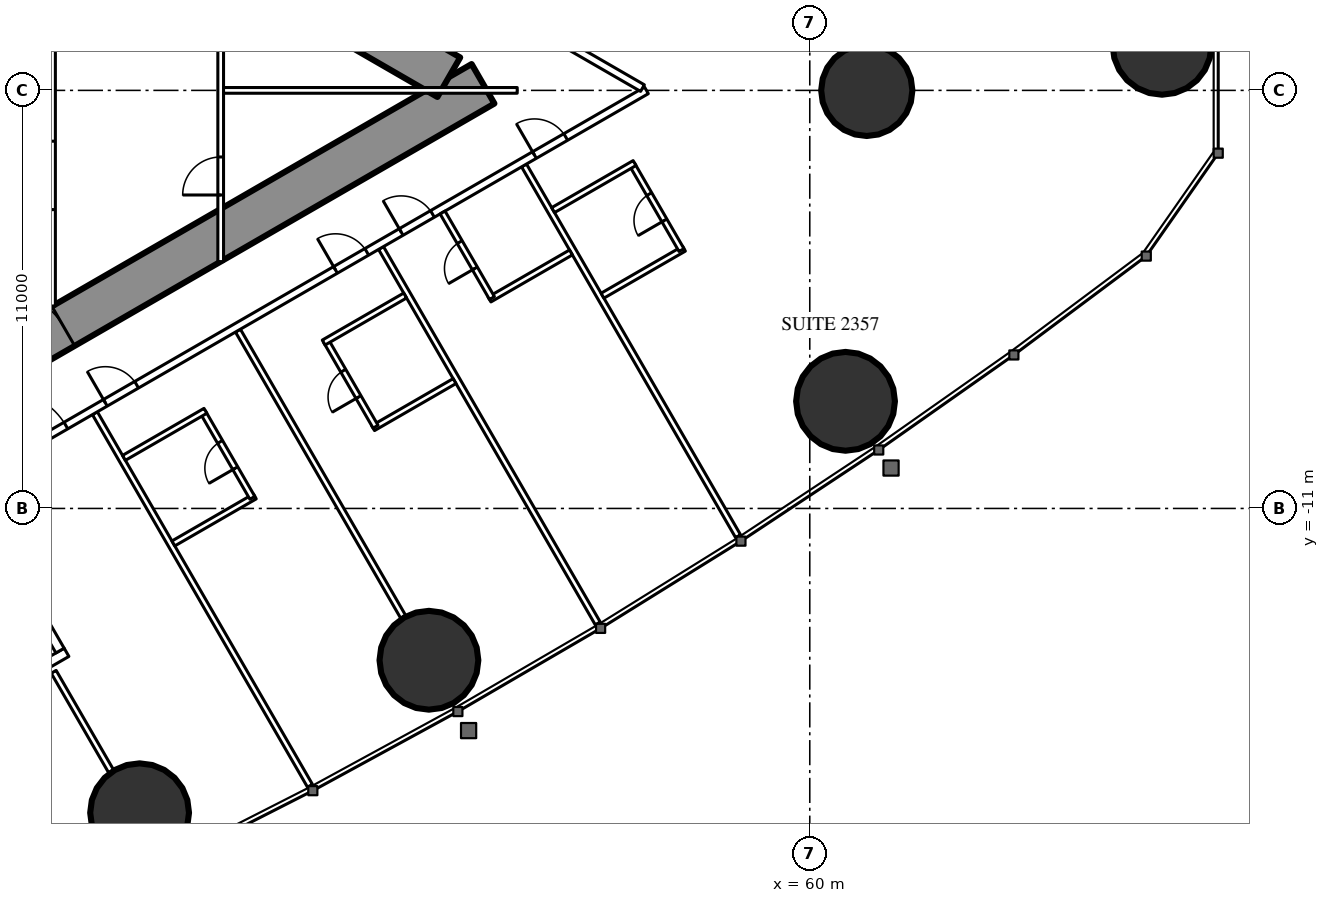
"""IFC4 building model, lengths in metres.
Left out: names, types, materials, properties, quantities, classifications, styles, units other than length and angle.
Written with IfcOpenShell. Run it as: python <this file> out.ifc"""

import sys

from ifc_helpers import new_model, si_unit, direction, frame, frame_2d, origin, origin_2d, place, context, subcontext, project, spatial, rectangle, circle, hollow_circle, extrude, element, fill, save


model = new_model("IFC4")
c1 = context("Model", 3, precision=1e-05, world=origin(), true_north=direction((0.0, 1.0)))
c2 = subcontext(c1, "Body", "Model", "MODEL_VIEW")
j1 = project(units=[si_unit("LENGTHUNIT", "METRE"), si_unit("PLANEANGLEUNIT", "RADIAN")], contexts=[c1])
p1 = place(None, origin())
s1 = spatial("IfcSite", under=j1, at=p1, CompositionType="ELEMENT")
p2 = place(p1, origin())
s2 = spatial("IfcBuilding", under=s1, at=p2, CompositionType="ELEMENT")
p3 = place(p2, frame((0.0, 0.0, 90.6)))
s3 = spatial("IfcBuildingStorey", under=s2, at=p3, CompositionType="ELEMENT", Elevation=90.6)
for number, where, z_axis, x_axis in (
    (1, (69.269, 1.187, 0.0), (0.0, 0.0, 1.0), (1.0, 0.0, 0.0)),
    (2, (42.366, -19.007, 0.0), (0.0, 0.0, 1.0), (1.0, 0.0, 0.0)),
    (3, (49.979, -14.994, 0.0), (0.0, 0.0, 1.0), (1.0, 0.0, 0.0)),
    (4, (60.941, -8.181, 0.0), (0.0, 0.0, 1.0), (1.0, 0.0, 0.0)),
):
    element("IfcColumn", number, at=place(p3, frame(where, z_axis=z_axis, x_axis=x_axis)), inside=s3, PredefinedType="COLUMN", context=c2, shape_type="SweptSolid", body=[
        extrude(hollow_circle(Radius=1.3, WallThickness=0.1, at=origin_2d()), origin(), (0.0, 0.0, 1.0), 3.5),
    ])
p4 = place(p3, frame((61.5, 0.0, 0.0), z_axis=(0.0, 0.0, 1.0), x_axis=(1.0, 0.0, 0.0)))
e5 = element("IfcColumn", 5, at=p4, inside=s3, PredefinedType="COLUMN", context=c2, shape_type="SweptSolid", body=[
    extrude(circle(Radius=1.2, at=origin_2d()), origin(), (0.0, 0.0, 1.0), 3.5),
])
p5 = place(p3, frame((27.2, -13.8, 0.0), z_axis=(0.0, 0.0, 1.0), x_axis=(0.866027159892, 0.499996958321, 0.0)))
e6 = element("IfcWall", 6, at=p5, inside=s3, PredefinedType="SHEAR", context=c2, shape_type="SweptSolid", body=[
    extrude(rectangle(XDim=27.947, YDim=1.2, at=frame_2d((13.973, 0.0))), origin(), (0.0, 0.0, 1.0), 3.5),
])
p6 = place(p5, frame((4.6, 0.0, 0.0)))
e7 = element("IfcOpeningElement", 7, at=p6, cuts=e6, PredefinedType="OPENING", context=c2, shape_type="SweptSolid", body=[
    extrude(rectangle(XDim=1.0, YDim=2.2, at=frame_2d((0.5, 1.1))), frame((0.0, 0.61, 0.0), z_axis=(0.0, -1.0, 0.0), x_axis=(1.0, 0.0, 0.0)), (0.0, 0.0, 1.0), 1.22),
])
p7 = place(p5, frame((13.395, 0.0, 0.0)))
e8 = element("IfcOpeningElement", 8, at=p7, cuts=e6, PredefinedType="OPENING", context=c2, shape_type="SweptSolid", body=[
    extrude(rectangle(XDim=1.8, YDim=2.2, at=frame_2d((0.9, 1.1))), frame((0.0, 0.61, 0.0), z_axis=(0.0, -1.0, 0.0), x_axis=(1.0, 0.0, 0.0)), (0.0, 0.0, 1.0), 1.22),
])
p8 = place(p3, frame((27.2, 13.8, 0.0), z_axis=(0.0, 0.0, 1.0), x_axis=(0.866024515034, -0.500001539357, 0.0)))
e9 = element("IfcWall", 9, at=p8, inside=s3, PredefinedType="SHEAR", context=c2, shape_type="SweptSolid", body=[
    extrude(rectangle(XDim=26.907, YDim=1.2, at=frame_2d((13.454, 0.0))), origin(), (0.0, 0.0, 1.0), 3.5),
])
p9 = place(p8, frame((4.6, 0.0, 0.0)))
e10 = element("IfcOpeningElement", 10, at=p9, cuts=e9, PredefinedType="OPENING", context=c2, shape_type="SweptSolid", body=[
    extrude(rectangle(XDim=1.0, YDim=2.2, at=frame_2d((0.5, 1.1))), frame((0.0, 0.61, 0.0), z_axis=(0.0, -1.0, 0.0), x_axis=(1.0, 0.0, 0.0)), (0.0, 0.0, 1.0), 1.22),
])
p10 = place(p8, frame((13.395, 0.0, 0.0)))
e11 = element("IfcOpeningElement", 11, at=p10, cuts=e9, PredefinedType="OPENING", context=c2, shape_type="SweptSolid", body=[
    extrude(rectangle(XDim=1.8, YDim=2.2, at=frame_2d((0.9, 1.1))), frame((0.0, 0.61, 0.0), z_axis=(0.0, -1.0, 0.0), x_axis=(1.0, 0.0, 0.0)), (0.0, 0.0, 1.0), 1.22),
])
p11 = place(p3, frame((41.19, -8.494, 0.0), z_axis=(0.0, 0.0, 1.0), x_axis=(0.49999258054, -0.866029687369, 0.0)))
e12 = element("IfcWall", 12, at=p11, inside=s3, PredefinedType="PARTITIONING", context=c2, shape_type="SweptSolid", body=[
    extrude(rectangle(XDim=11.318, YDim=0.15, at=frame_2d((5.659, 0.0))), origin(), (0.0, 0.0, 1.0), 3.25),
])
p12 = place(p3, frame((44.954, -6.321, 0.0), z_axis=(0.0, 0.0, 1.0), x_axis=(0.500018676722, -0.866014620505, 0.0)))
e13 = element("IfcWall", 13, at=p12, inside=s3, PredefinedType="PARTITIONING", context=c2, shape_type="SweptSolid", body=[
    extrude(rectangle(XDim=8.704, YDim=0.15, at=frame_2d((4.352, 0.0))), origin(), (0.0, 0.0, 1.0), 2.2),
])
p13 = place(p3, frame((48.719, -4.147, 0.0), z_axis=(0.0, 0.0, 1.0), x_axis=(0.499990498062, -0.866030889661, 0.0)))
e14 = element("IfcWall", 14, at=p13, inside=s3, PredefinedType="PARTITIONING", context=c2, shape_type="SweptSolid", body=[
    extrude(rectangle(XDim=11.406, YDim=0.15, at=frame_2d((5.703, 0.0))), origin(), (0.0, 0.0, 1.0), 3.25),
])
p14 = place(p3, frame((52.481, -1.975, 0.0), z_axis=(0.0, 0.0, 1.0), x_axis=(0.500003867771, -0.866023170714, 0.0)))
e15 = element("IfcWall", 15, at=p14, inside=s3, PredefinedType="PARTITIONING", context=c2, shape_type="SweptSolid", body=[
    extrude(rectangle(XDim=11.265, YDim=0.15, at=frame_2d((5.632, 0.0))), origin(), (0.0, 0.0, 1.0), 3.25),
])
p15 = place(p3, frame((40.105, -15.299, 0.0), z_axis=(0.0, 0.0, 1.0), x_axis=(0.499978822259, -0.866037630414, 0.0)))
e16 = element("IfcWall", 16, at=p15, inside=s3, PredefinedType="PARTITIONING", context=c2, shape_type="SweptSolid", body=[
    extrude(rectangle(XDim=3.023, YDim=0.15, at=frame_2d((1.511, 0.0))), origin(), (0.0, 0.0, 1.0), 3.25),
])
p16 = place(p3, frame((37.96, -10.243, 0.0), z_axis=(0.0, 0.0, 1.0), x_axis=(0.866026429433, 0.499998223521, 0.0)))
e17 = element("IfcWall", 17, at=p16, inside=s3, PredefinedType="PARTITIONING", context=c2, shape_type="SweptSolid", body=[
    extrude(rectangle(XDim=20.487, YDim=0.2, at=frame_2d((10.243, 0.0))), origin(), (0.0, 0.0, 1.0), 3.25),
])
p17 = place(p16, frame((4.047, 0.0, 0.0)))
e18 = element("IfcOpeningElement", 18, at=p17, cuts=e17, PredefinedType="OPENING", context=c2, shape_type="SweptSolid", body=[
    extrude(rectangle(XDim=0.95, YDim=2.2, at=frame_2d((0.475, 1.1))), frame((0.0, 0.11, 0.0), z_axis=(0.0, -1.0, 0.0), x_axis=(1.0, 0.0, 0.0)), (0.0, 0.0, 1.0), 0.22),
])
p18 = place(p16, frame((11.04, 0.0, 0.0)))
e19 = element("IfcOpeningElement", 19, at=p18, cuts=e17, PredefinedType="OPENING", context=c2, shape_type="SweptSolid", body=[
    extrude(rectangle(XDim=0.95, YDim=2.2, at=frame_2d((0.475, 1.1))), frame((0.0, 0.11, 0.0), z_axis=(0.0, -1.0, 0.0), x_axis=(1.0, 0.0, 0.0)), (0.0, 0.0, 1.0), 0.22),
])
p19 = place(p16, frame((13.035, 0.0, 0.0)))
e20 = element("IfcOpeningElement", 20, at=p19, cuts=e17, PredefinedType="OPENING", context=c2, shape_type="SweptSolid", body=[
    extrude(rectangle(XDim=0.95, YDim=2.2, at=frame_2d((0.475, 1.1))), frame((0.0, 0.11, 0.0), z_axis=(0.0, -1.0, 0.0), x_axis=(1.0, 0.0, 0.0)), (0.0, 0.0, 1.0), 0.22),
])
p20 = place(p16, frame((17.085, 0.0, 0.0)))
e21 = element("IfcOpeningElement", 21, at=p20, cuts=e17, PredefinedType="OPENING", context=c2, shape_type="SweptSolid", body=[
    extrude(rectangle(XDim=0.95, YDim=2.2, at=frame_2d((0.475, 1.1))), frame((0.0, 0.11, 0.0), z_axis=(0.0, -1.0, 0.0), x_axis=(1.0, 0.0, 0.0)), (0.0, 0.0, 1.0), 0.22),
])
p21 = place(p16, frame((1.048, 0.0, 0.0)))
e22 = element("IfcOpeningElement", 22, at=p21, cuts=e17, PredefinedType="OPENING", context=c2, shape_type="SweptSolid", body=[
    extrude(rectangle(XDim=1.8, YDim=2.2, at=frame_2d((0.9, 1.1))), frame((0.0, 0.11, 0.0), z_axis=(0.0, -1.0, 0.0), x_axis=(1.0, 0.0, 0.0)), (0.0, 0.0, 1.0), 0.22),
])
p22 = place(p3, frame((36.834, 10.894, 0.0), z_axis=(0.0, 0.0, 1.0), x_axis=(0.866028157229, -0.499995230863, 0.0)))
e23 = element("IfcWall", 23, at=p22, inside=s3, PredefinedType="PARTITIONING", context=c2, shape_type="SweptSolid", body=[
    extrude(rectangle(XDim=21.667, YDim=0.2, at=frame_2d((10.833, 0.0))), origin(), (0.0, 0.0, 1.0), 3.25),
])
p23 = place(p22, frame((14.04, 0.0, 0.0)))
e24 = element("IfcOpeningElement", 24, at=p23, cuts=e23, PredefinedType="OPENING", context=c2, shape_type="SweptSolid", body=[
    extrude(rectangle(XDim=0.95, YDim=2.2, at=frame_2d((0.475, 1.1))), frame((0.0, 0.11, 0.0), z_axis=(0.0, -1.0, 0.0), x_axis=(1.0, 0.0, 0.0)), (0.0, 0.0, 1.0), 0.22),
])
p24 = place(p22, frame((9.99, 0.0, 0.0)))
e25 = element("IfcOpeningElement", 25, at=p24, cuts=e23, PredefinedType="OPENING", context=c2, shape_type="SweptSolid", body=[
    extrude(rectangle(XDim=0.95, YDim=2.2, at=frame_2d((0.475, 1.1))), frame((0.0, 0.11, 0.0), z_axis=(0.0, -1.0, 0.0), x_axis=(1.0, 0.0, 0.0)), (0.0, 0.0, 1.0), 0.22),
])
p25 = place(p22, frame((3.35, 0.0, 0.0)))
e26 = element("IfcOpeningElement", 26, at=p25, cuts=e23, PredefinedType="OPENING", context=c2, shape_type="SweptSolid", body=[
    extrude(rectangle(XDim=1.0, YDim=2.2, at=frame_2d((0.5, 1.1))), frame((0.0, 0.11, 0.0), z_axis=(0.0, -1.0, 0.0), x_axis=(1.0, 0.0, 0.0)), (0.0, 0.0, 1.0), 0.22),
])
p26 = place(p3, frame((43.255, -11.921, 0.0), z_axis=(0.0, 0.0, 1.0), x_axis=(0.866006523861, 0.500032699561, 0.0)))
e27 = element("IfcWall", 27, at=p26, inside=s3, PredefinedType="PARTITIONING", context=c2, shape_type="SweptSolid", body=[
    extrude(rectangle(XDim=2.475, YDim=0.15, at=frame_2d((1.237, 0.0))), origin(), (0.0, 0.0, 1.0), 3.25),
])
p27 = place(p3, frame((44.033, -8.469, 0.0), z_axis=(0.0, 0.0, 1.0), x_axis=(0.500047596559, -0.865997922154, 0.0)))
e28 = element("IfcWall", 28, at=p27, inside=s3, PredefinedType="PARTITIONING", context=c2, shape_type="SweptSolid", body=[
    extrude(rectangle(XDim=2.6, YDim=0.15, at=frame_2d((1.3, 0.0))), origin(), (0.0, 0.0, 1.0), 3.25),
])
p28 = place(p27, frame((0.9, 0.0, 0.0)))
e29 = element("IfcOpeningElement", 29, at=p28, cuts=e28, PredefinedType="OPENING", context=c2, shape_type="SweptSolid", body=[
    extrude(rectangle(XDim=0.8, YDim=2.2, at=frame_2d((0.4, 1.1))), frame((0.0, 0.085, 0.0), z_axis=(0.0, -1.0, 0.0), x_axis=(1.0, 0.0, 0.0)), (0.0, 0.0, 1.0), 0.17),
])
p29 = place(p3, frame((41.955, -9.669, 0.0), z_axis=(0.0, 0.0, 1.0), x_axis=(0.866006523861, 0.500032699561, 0.0)))
e30 = element("IfcWall", 30, at=p29, inside=s3, PredefinedType="PARTITIONING", context=c2, shape_type="SweptSolid", body=[
    extrude(rectangle(XDim=2.475, YDim=0.15, at=frame_2d((1.237, 0.0))), origin(), (0.0, 0.0, 1.0), 3.25),
])
p30 = place(p3, frame((48.51, -8.887, 0.0), z_axis=(0.0, 0.0, 1.0), x_axis=(0.866031185235, 0.4999899861, 0.0)))
e31 = element("IfcWall", 31, at=p30, inside=s3, PredefinedType="PARTITIONING", context=c2, shape_type="SweptSolid", body=[
    extrude(rectangle(XDim=2.475, YDim=0.15, at=frame_2d((1.238, 0.0))), origin(), (0.0, 0.0, 1.0), 3.25),
])
p31 = place(p3, frame((47.275, -6.597, 0.0), z_axis=(0.0, 0.0, 1.0), x_axis=(0.499936506574, -0.866062058628, 0.0)))
e32 = element("IfcWall", 32, at=p31, inside=s3, PredefinedType="PARTITIONING", context=c2, shape_type="SweptSolid", body=[
    extrude(rectangle(XDim=2.6, YDim=0.15, at=frame_2d((1.3, 0.0))), origin(), (0.0, 0.0, 1.0), 3.25),
])
p32 = place(p31, frame((0.9, 0.0, 0.0)))
e33 = element("IfcOpeningElement", 33, at=p32, cuts=e32, PredefinedType="OPENING", context=c2, shape_type="SweptSolid", body=[
    extrude(rectangle(XDim=0.8, YDim=2.2, at=frame_2d((0.4, 1.1))), frame((0.0, 0.085, 0.0), z_axis=(0.0, -1.0, 0.0), x_axis=(1.0, 0.0, 0.0)), (0.0, 0.0, 1.0), 0.17),
])
for number, where, z_axis, x_axis in (
    (34, (47.21, -6.635, 0.0), (0.0, 0.0, 1.0), (0.866, 0.5, 0.0)),
    (35, (51.573, -5.502, 0.0), (0.0, 0.0, 1.0), (0.866, 0.5, 0.0)),
):
    element("IfcWall", number, at=place(p3, frame(where, z_axis=z_axis, x_axis=x_axis)), inside=s3, PredefinedType="PARTITIONING", context=c2, shape_type="SweptSolid", body=[
        extrude(rectangle(XDim=2.475, YDim=0.15, at=frame_2d((1.237, 0.0))), origin(), (0.0, 0.0, 1.0), 3.25),
    ])
p33 = place(p3, frame((50.338, -3.213, 0.0), z_axis=(0.0, 0.0, 1.0), x_axis=(0.500047596559, -0.865997922154, 0.0)))
e36 = element("IfcWall", 36, at=p33, inside=s3, PredefinedType="PARTITIONING", context=c2, shape_type="SweptSolid", body=[
    extrude(rectangle(XDim=2.6, YDim=0.15, at=frame_2d((1.3, 0.0))), origin(), (0.0, 0.0, 1.0), 3.25),
])
p34 = place(p33, frame((0.9, 0.0, 0.0)))
e37 = element("IfcOpeningElement", 37, at=p34, cuts=e36, PredefinedType="OPENING", context=c2, shape_type="SweptSolid", body=[
    extrude(rectangle(XDim=0.8, YDim=2.2, at=frame_2d((0.4, 1.1))), frame((0.0, 0.085, 0.0), z_axis=(0.0, -1.0, 0.0), x_axis=(1.0, 0.0, 0.0)), (0.0, 0.0, 1.0), 0.17),
])
p35 = place(p3, frame((54.546, -5.402, 0.0), z_axis=(0.0, 0.0, 1.0), x_axis=(0.866006523861, 0.500032699561, 0.0)))
e38 = element("IfcWall", 38, at=p35, inside=s3, PredefinedType="PARTITIONING", context=c2, shape_type="SweptSolid", body=[
    extrude(rectangle(XDim=2.475, YDim=0.15, at=frame_2d((1.237, 0.0))), origin(), (0.0, 0.0, 1.0), 3.25),
])
p36 = place(p3, frame((55.325, -1.95, 0.0), z_axis=(0.0, 0.0, 1.0), x_axis=(0.500006934395, -0.866021400173, 0.0)))
e39 = element("IfcWall", 39, at=p36, inside=s3, PredefinedType="PARTITIONING", context=c2, shape_type="SweptSolid", body=[
    extrude(rectangle(XDim=2.6, YDim=0.15, at=frame_2d((1.3, 0.0))), origin(), (0.0, 0.0, 1.0), 3.25),
])
p37 = place(p36, frame((0.9, 0.0, 0.0)))
e40 = element("IfcOpeningElement", 40, at=p37, cuts=e39, PredefinedType="OPENING", context=c2, shape_type="SweptSolid", body=[
    extrude(rectangle(XDim=0.8, YDim=2.2, at=frame_2d((0.4, 1.1))), frame((0.0, 0.085, 0.0), z_axis=(0.0, -1.0, 0.0), x_axis=(1.0, 0.0, 0.0)), (0.0, 0.0, 1.0), 0.17),
])
p38 = place(p3, frame((53.246, -3.15, 0.0), z_axis=(0.0, 0.0, 1.0), x_axis=(0.866006523861, 0.500032699561, 0.0)))
e41 = element("IfcWall", 41, at=p38, inside=s3, PredefinedType="PARTITIONING", context=c2, shape_type="SweptSolid", body=[
    extrude(rectangle(XDim=2.475, YDim=0.15, at=frame_2d((1.237, 0.0))), origin(), (0.0, 0.0, 1.0), 3.25),
])
p39 = place(p3, frame((40.075, -5.674, 0.0), z_axis=(0.0, 0.0, 1.0), x_axis=(0.0, 1.0, 0.0)))
e42 = element("IfcWall", 42, at=p39, inside=s3, PredefinedType="PARTITIONING", context=c2, shape_type="SweptSolid", body=[
    extrude(rectangle(XDim=6.874, YDim=0.15, at=frame_2d((3.437, 0.0))), origin(), (0.0, 0.0, 1.0), 3.25),
])
p40 = place(p39, frame((2.537, 0.0, 0.0)))
e43 = element("IfcOpeningElement", 43, at=p40, cuts=e42, PredefinedType="OPENING", context=c2, shape_type="SweptSolid", body=[
    extrude(rectangle(XDim=1.8, YDim=2.2, at=frame_2d((0.9, 1.1))), frame((0.0, 0.085, 0.0), z_axis=(0.0, -1.0, 0.0), x_axis=(1.0, 0.0, 0.0)), (0.0, 0.0, 1.0), 0.17),
])
p41 = place(p3, frame((44.5, -4.505, 0.0), z_axis=(0.0, 0.0, 1.0), x_axis=(0.0, 1.0, 0.0)))
e44 = element("IfcWall", 44, at=p41, inside=s3, PredefinedType="PARTITIONING", context=c2, shape_type="SweptSolid", body=[
    extrude(rectangle(XDim=9.009, YDim=0.15, at=frame_2d((4.505, 0.0))), origin(), (0.0, 0.0, 1.0), 2.45),
])
p42 = place(p41, frame((1.752, 0.0, 0.0)))
e45 = element("IfcOpeningElement", 45, at=p42, cuts=e44, PredefinedType="OPENING", context=c2, shape_type="SweptSolid", body=[
    extrude(rectangle(XDim=1.0, YDim=2.2, at=frame_2d((0.5, 1.1))), frame((0.0, 0.085, 0.0), z_axis=(0.0, -1.0, 0.0), x_axis=(1.0, 0.0, 0.0)), (0.0, 0.0, 1.0), 0.17),
])
p43 = place(p41, frame((6.257, 0.0, 0.0)))
e46 = element("IfcOpeningElement", 46, at=p43, cuts=e44, PredefinedType="OPENING", context=c2, shape_type="SweptSolid", body=[
    extrude(rectangle(XDim=1.0, YDim=2.2, at=frame_2d((0.5, 1.1))), frame((0.0, 0.085, 0.0), z_axis=(0.0, -1.0, 0.0), x_axis=(1.0, 0.0, 0.0)), (0.0, 0.0, 1.0), 0.17),
])
p44 = place(p3, frame((44.575, 0.0, 0.0), z_axis=(0.0, 0.0, 1.0), x_axis=(1.0, 0.0, 0.0)))
e47 = element("IfcWall", 47, at=p44, inside=s3, PredefinedType="PARTITIONING", context=c2, shape_type="SweptSolid", body=[
    extrude(rectangle(XDim=7.727, YDim=0.15, at=frame_2d((3.864, 0.0))), origin(), (0.0, 0.0, 1.0), 2.2),
])
p45 = place(p3, frame((32.996, -19.086, 0.0), z_axis=(0.0, 0.0, 1.0), x_axis=(0.866028165386, 0.499995216735, 0.0)))
e48 = element("IfcWall", 48, at=p45, inside=s3, PredefinedType="PARTITIONING", context=c2, shape_type="SweptSolid", body=[
    extrude(rectangle(XDim=8.6, YDim=0.25, at=frame_2d((4.3, 0.0))), origin(), (0.0, 0.0, 1.0), 3.25),
])
p46 = place(p3, frame((38.673, -11.968, 0.0), z_axis=(0.0, 0.0, 1.0), x_axis=(0.499929347863, -0.866066190972, 0.0)))
e49 = element("IfcWall", 49, at=p46, inside=s3, PredefinedType="PARTITIONING", context=c2, shape_type="SweptSolid", body=[
    extrude(rectangle(XDim=3.201, YDim=0.25, at=frame_2d((1.6, 0.0))), origin(), (0.0, 0.0, 1.0), 3.25),
])
p47 = place(p28, origin())
e50 = element("IfcDoor", 50, at=p47, inside=s3, OperationType="SINGLE_SWING_RIGHT", PredefinedType="DOOR", context=c2, shape_type="SweptSolid", body=[
    extrude(rectangle(XDim=0.8, YDim=2.2, at=frame_2d((0.4, 1.1))), frame((0.0, 0.025, 0.0), z_axis=(0.0, -1.0, 0.0), x_axis=(1.0, 0.0, 0.0)), (0.0, 0.0, 1.0), 0.05),
])
fill(e29, e50)
p48 = place(p17, origin())
e51 = element("IfcDoor", 51, at=p48, inside=s3, OperationType="SINGLE_SWING_LEFT", PredefinedType="DOOR", context=c2, shape_type="SweptSolid", body=[
    extrude(rectangle(XDim=0.95, YDim=2.2, at=frame_2d((0.475, 1.1))), frame((0.0, 0.025, 0.0), z_axis=(0.0, -1.0, 0.0), x_axis=(1.0, 0.0, 0.0)), (0.0, 0.0, 1.0), 0.05),
])
fill(e18, e51)
p49 = place(p32, origin())
e52 = element("IfcDoor", 52, at=p49, inside=s3, OperationType="SINGLE_SWING_RIGHT", PredefinedType="DOOR", context=c2, shape_type="SweptSolid", body=[
    extrude(rectangle(XDim=0.8, YDim=2.2, at=frame_2d((0.4, 1.1))), frame((0.0, 0.025, 0.0), z_axis=(0.0, -1.0, 0.0), x_axis=(1.0, 0.0, 0.0)), (0.0, 0.0, 1.0), 0.05),
])
fill(e33, e52)
p50 = place(p18, origin())
e53 = element("IfcDoor", 53, at=p50, inside=s3, OperationType="SINGLE_SWING_LEFT", PredefinedType="DOOR", context=c2, shape_type="SweptSolid", body=[
    extrude(rectangle(XDim=0.95, YDim=2.2, at=frame_2d((0.475, 1.1))), frame((0.0, 0.025, 0.0), z_axis=(0.0, -1.0, 0.0), x_axis=(1.0, 0.0, 0.0)), (0.0, 0.0, 1.0), 0.05),
])
fill(e19, e53)
p51 = place(p34, origin())
e54 = element("IfcDoor", 54, at=p51, inside=s3, OperationType="SINGLE_SWING_RIGHT", PredefinedType="DOOR", context=c2, shape_type="SweptSolid", body=[
    extrude(rectangle(XDim=0.8, YDim=2.2, at=frame_2d((0.4, 1.1))), frame((0.0, 0.025, 0.0), z_axis=(0.0, -1.0, 0.0), x_axis=(1.0, 0.0, 0.0)), (0.0, 0.0, 1.0), 0.05),
])
fill(e37, e54)
p52 = place(p19, origin())
e55 = element("IfcDoor", 55, at=p52, inside=s3, OperationType="SINGLE_SWING_LEFT", PredefinedType="DOOR", context=c2, shape_type="SweptSolid", body=[
    extrude(rectangle(XDim=0.95, YDim=2.2, at=frame_2d((0.475, 1.1))), frame((0.0, 0.025, 0.0), z_axis=(0.0, -1.0, 0.0), x_axis=(1.0, 0.0, 0.0)), (0.0, 0.0, 1.0), 0.05),
])
fill(e20, e55)
p53 = place(p37, origin())
e56 = element("IfcDoor", 56, at=p53, inside=s3, OperationType="SINGLE_SWING_RIGHT", PredefinedType="DOOR", context=c2, shape_type="SweptSolid", body=[
    extrude(rectangle(XDim=0.8, YDim=2.2, at=frame_2d((0.4, 1.1))), frame((0.0, 0.025, 0.0), z_axis=(0.0, -1.0, 0.0), x_axis=(1.0, 0.0, 0.0)), (0.0, 0.0, 1.0), 0.05),
])
fill(e40, e56)
p54 = place(p20, origin())
e57 = element("IfcDoor", 57, at=p54, inside=s3, OperationType="SINGLE_SWING_LEFT", PredefinedType="DOOR", context=c2, shape_type="SweptSolid", body=[
    extrude(rectangle(XDim=0.95, YDim=2.2, at=frame_2d((0.475, 1.1))), frame((0.0, 0.025, 0.0), z_axis=(0.0, -1.0, 0.0), x_axis=(1.0, 0.0, 0.0)), (0.0, 0.0, 1.0), 0.05),
])
fill(e21, e57)
p55 = place(p21, origin())
e58 = element("IfcDoor", 58, at=p55, inside=s3, OperationType="DOUBLE_DOOR_SINGLE_SWING", PredefinedType="DOOR", context=c2, shape_type="SweptSolid", body=[
    extrude(rectangle(XDim=1.8, YDim=2.2, at=frame_2d((0.9, 1.1))), frame((0.0, 0.025, 0.0), z_axis=(0.0, -1.0, 0.0), x_axis=(1.0, 0.0, 0.0)), (0.0, 0.0, 1.0), 0.05),
])
fill(e22, e58)
p56 = place(p40, origin())
e59 = element("IfcDoor", 59, at=p56, inside=s3, OperationType="DOUBLE_DOOR_SINGLE_SWING", PredefinedType="DOOR", context=c2, shape_type="SweptSolid", body=[
    extrude(rectangle(XDim=1.8, YDim=2.2, at=frame_2d((0.9, 1.1))), frame((0.0, 0.025, 0.0), z_axis=(0.0, -1.0, 0.0), x_axis=(1.0, 0.0, 0.0)), (0.0, 0.0, 1.0), 0.05),
])
fill(e43, e59)
p57 = place(p42, origin())
e60 = element("IfcDoor", 60, at=p57, inside=s3, OperationType="SINGLE_SWING_LEFT", PredefinedType="DOOR", context=c2, shape_type="SweptSolid", body=[
    extrude(rectangle(XDim=1.0, YDim=2.2, at=frame_2d((0.5, 1.1))), frame((0.0, 0.025, 0.0), z_axis=(0.0, -1.0, 0.0), x_axis=(1.0, 0.0, 0.0)), (0.0, 0.0, 1.0), 0.05),
])
fill(e45, e60)
p58 = place(p7, origin())
e61 = element("IfcDoor", 61, at=p58, inside=s3, OperationType="DOUBLE_DOOR_SINGLE_SWING", PredefinedType="DOOR", context=c2, shape_type="SweptSolid", body=[
    extrude(rectangle(XDim=1.8, YDim=2.2, at=frame_2d((0.9, 1.1))), frame((0.0, 0.025, 0.0), z_axis=(0.0, -1.0, 0.0), x_axis=(1.0, 0.0, 0.0)), (0.0, 0.0, 1.0), 0.05),
])
fill(e8, e61)
save(model, sys.argv[1])
